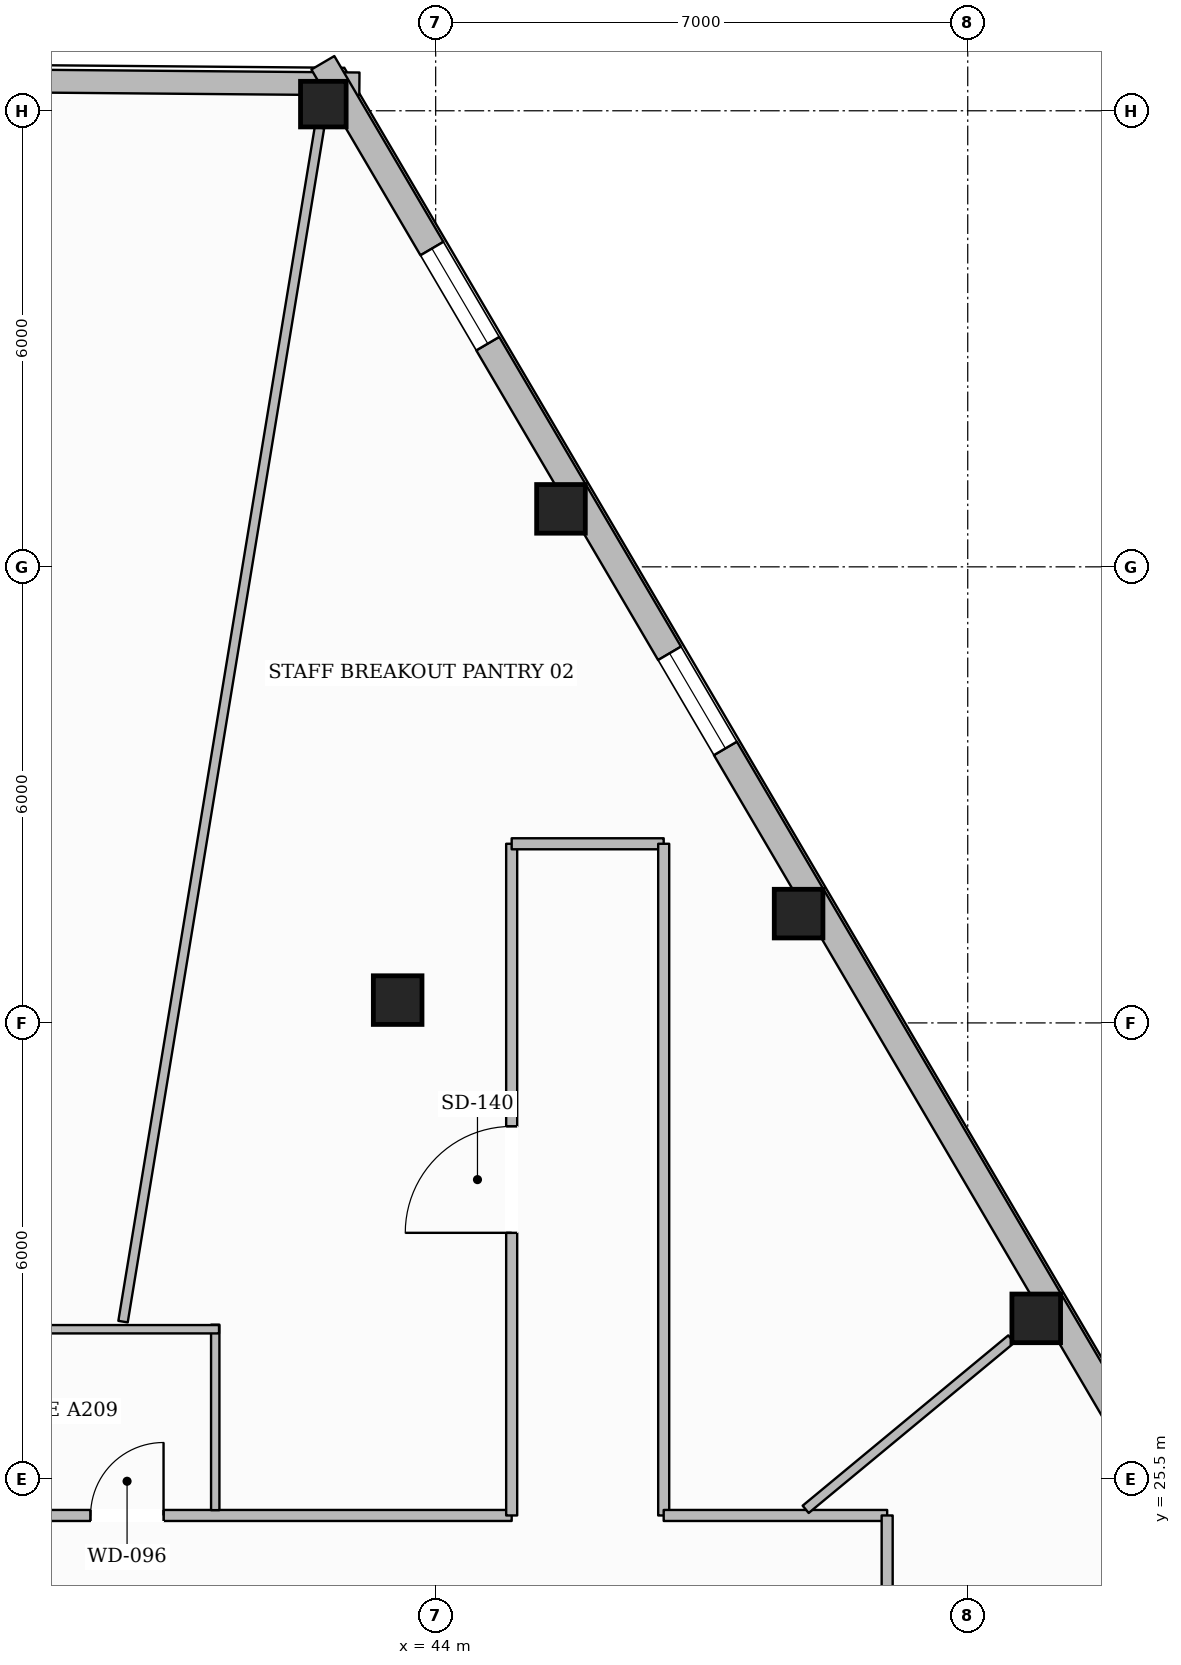
"""IFC4 building model, lengths in metres.
Left out: names, types, materials, properties, quantities, classifications, styles, units other than length and angle.
Written with IfcOpenShell. Run it as: python <this file> out.ifc"""

import sys

from ifc_helpers import new_model, si_unit, direction, frame, frame_2d, origin, origin_2d, place, context, subcontext, project, spatial, rectangle, hollow_rectangle, extrude, element, fill, save


model = new_model("IFC4")
c1 = context("Model", 3, precision=1e-05, world=origin(), true_north=direction((0.0, 1.0)))
c2 = subcontext(c1, "Body", "Model", "MODEL_VIEW")
j1 = project(units=[si_unit("LENGTHUNIT", "METRE"), si_unit("PLANEANGLEUNIT", "RADIAN")], contexts=[c1])
p1 = place(None, origin())
s1 = spatial("IfcSite", under=j1, at=p1, CompositionType="ELEMENT")
p2 = place(p1, origin())
s2 = spatial("IfcBuilding", under=s1, at=p2, CompositionType="ELEMENT")
p3 = place(p2, frame((0.0, 0.0, 191.95)))
s3 = spatial("IfcBuildingStorey", under=s2, at=p3, CompositionType="ELEMENT", Elevation=191.95)
for number, where, z_axis, x_axis in (
    (1, (51.901, 27.613, 0.0), (0.0, 0.0, 1.0), (1.0, 0.0, 0.0)),
    (2, (48.775, 32.938, 0.0), (0.0, 0.0, 1.0), (1.0, 0.0, 0.0)),
    (3, (45.648, 38.263, 0.0), (0.0, 0.0, 1.0), (1.0, 0.0, 0.0)),
):
    element("IfcColumn", number, at=place(p3, frame(where, z_axis=z_axis, x_axis=x_axis)), inside=s3, PredefinedType="COLUMN", context=c2, shape_type="SweptSolid", body=[
        extrude(hollow_rectangle(XDim=0.64, YDim=0.64, WallThickness=0.028, at=origin_2d()), origin(), (0.0, 0.0, 1.0), 3.6),
    ])
p4 = place(p3, frame((42.522, 43.587, 0.0), z_axis=(0.0, 0.0, 1.0), x_axis=(1.0, 0.0, 0.0)))
e4 = element("IfcColumn", 4, at=p4, inside=s3, PredefinedType="COLUMN", context=c2, shape_type="SweptSolid", body=[
    extrude(hollow_rectangle(XDim=0.6, YDim=0.6, WallThickness=0.028, at=origin_2d()), origin(), (0.0, 0.0, 1.0), 3.6),
])
p5 = place(p3, frame((43.5, 31.8, 0.0), z_axis=(0.0, 0.0, 1.0), x_axis=(1.0, 0.0, 0.0)))
e5 = element("IfcColumn", 5, at=p5, inside=s3, PredefinedType="COLUMN", context=c2, shape_type="SweptSolid", body=[
    extrude(hollow_rectangle(XDim=0.64, YDim=0.64, WallThickness=0.028, at=origin_2d()), origin(), (0.0, 0.0, 1.0), 3.6),
])
p6 = place(p3, frame((33.139, 43.938, 0.0), z_axis=(0.0, 0.0, 1.0), x_axis=(0.999963705721, -0.008519814607, 0.0)))
e6 = element("IfcWall", 6, at=p6, inside=s3, PredefinedType="STANDARD", context=c2, shape_type="SweptSolid", body=[
    extrude(rectangle(XDim=9.857, YDim=0.3, at=frame_2d((4.929, 0.0))), origin(), (0.0, 0.0, 1.0), 3.132),
])
p7 = place(p6, frame((4.404, 0.0, 0.65)))
e7 = element("IfcOpeningElement", 7, at=p7, cuts=e6, PredefinedType="OPENING", context=c2, shape_type="SweptSolid", body=[
    extrude(rectangle(XDim=1.05, YDim=1.7, at=frame_2d((0.525, 0.85))), frame((0.0, 0.16, 0.0), z_axis=(0.0, -1.0, 0.0), x_axis=(1.0, 0.0, 0.0)), (0.0, 0.0, 1.0), 0.32),
])
p8 = place(p3, frame((42.516, 44.131, 0.0), z_axis=(0.0, 0.0, 1.0), x_axis=(0.506310158323, -0.862351450152, 0.0)))
e8 = element("IfcWall", 8, at=p8, inside=s3, PredefinedType="STANDARD", context=c2, shape_type="SweptSolid", body=[
    extrude(rectangle(XDim=38.0, YDim=0.35, at=frame_2d((19.0, 0.0))), origin(), (0.0, 0.0, 1.0), 3.132),
])
p9 = place(p8, frame((33.708, 0.0, 0.65)))
e9 = element("IfcOpeningElement", 9, at=p9, cuts=e8, PredefinedType="OPENING", context=c2, shape_type="SweptSolid", body=[
    extrude(rectangle(XDim=1.45, YDim=1.75, at=frame_2d((0.725, 0.875))), frame((0.0, 0.185, 0.0), z_axis=(0.0, -1.0, 0.0), x_axis=(1.0, 0.0, 0.0)), (0.0, 0.0, 1.0), 0.37),
])
p10 = place(p8, frame((27.534, 0.0, 0.65)))
e10 = element("IfcOpeningElement", 10, at=p10, cuts=e8, PredefinedType="OPENING", context=c2, shape_type="SweptSolid", body=[
    extrude(rectangle(XDim=1.45, YDim=1.75, at=frame_2d((0.725, 0.875))), frame((0.0, 0.185, 0.0), z_axis=(0.0, -1.0, 0.0), x_axis=(1.0, 0.0, 0.0)), (0.0, 0.0, 1.0), 0.37),
])
p11 = place(p8, frame((21.359, 0.0, 0.65)))
e11 = element("IfcOpeningElement", 11, at=p11, cuts=e8, PredefinedType="OPENING", context=c2, shape_type="SweptSolid", body=[
    extrude(rectangle(XDim=1.45, YDim=1.75, at=frame_2d((0.725, 0.875))), frame((0.0, 0.185, 0.0), z_axis=(0.0, -1.0, 0.0), x_axis=(1.0, 0.0, 0.0)), (0.0, 0.0, 1.0), 0.37),
])
p12 = place(p8, frame((9.009, 0.0, 0.65)))
e12 = element("IfcOpeningElement", 12, at=p12, cuts=e8, PredefinedType="OPENING", context=c2, shape_type="SweptSolid", body=[
    extrude(rectangle(XDim=1.45, YDim=1.75, at=frame_2d((0.725, 0.875))), frame((0.0, 0.185, 0.0), z_axis=(0.0, -1.0, 0.0), x_axis=(1.0, 0.0, 0.0)), (0.0, 0.0, 1.0), 0.37),
])
p13 = place(p8, frame((2.834, 0.0, 0.65)))
e13 = element("IfcOpeningElement", 13, at=p13, cuts=e8, PredefinedType="OPENING", context=c2, shape_type="SweptSolid", body=[
    extrude(rectangle(XDim=1.45, YDim=1.75, at=frame_2d((0.725, 0.875))), frame((0.0, 0.185, 0.0), z_axis=(0.0, -1.0, 0.0), x_axis=(1.0, 0.0, 0.0)), (0.0, 0.0, 1.0), 0.37),
])
p14 = place(p3, frame((31.0, 25.02, 0.0), z_axis=(0.0, 0.0, 1.0), x_axis=(1.0, 0.0, 0.0)))
e14 = element("IfcWall", 14, at=p14, inside=s3, PredefinedType="PARTITIONING", context=c2, shape_type="SweptSolid", body=[
    extrude(rectangle(XDim=14.0, YDim=0.145, at=frame_2d((7.0, 0.0))), origin(), (0.0, 0.0, 1.0), 3.6),
])
p15 = place(p14, frame((3.56, 0.0, 0.0)))
e15 = element("IfcOpeningElement", 15, at=p15, cuts=e14, PredefinedType="OPENING", context=c2, shape_type="SweptSolid", body=[
    extrude(rectangle(XDim=0.88, YDim=2.1, at=frame_2d((0.44, 1.05))), frame((0.0, 0.083, 0.0), z_axis=(0.0, -1.0, 0.0), x_axis=(1.0, 0.0, 0.0)), (0.0, 0.0, 1.0), 0.165),
])
p16 = place(p14, frame((6.08, 0.0, 0.0)))
e16 = element("IfcOpeningElement", 16, at=p16, cuts=e14, PredefinedType="OPENING", context=c2, shape_type="SweptSolid", body=[
    extrude(rectangle(XDim=0.88, YDim=2.1, at=frame_2d((0.44, 1.05))), frame((0.0, 0.083, 0.0), z_axis=(0.0, -1.0, 0.0), x_axis=(1.0, 0.0, 0.0)), (0.0, 0.0, 1.0), 0.165),
])
p17 = place(p14, frame((8.46, 0.0, 0.0)))
e17 = element("IfcOpeningElement", 17, at=p17, cuts=e14, PredefinedType="OPENING", context=c2, shape_type="SweptSolid", body=[
    extrude(rectangle(XDim=0.96, YDim=2.1, at=frame_2d((0.48, 1.05))), frame((0.0, 0.083, 0.0), z_axis=(0.0, -1.0, 0.0), x_axis=(1.0, 0.0, 0.0)), (0.0, 0.0, 1.0), 0.165),
])
p18 = place(p3, frame((45.0, 25.02, 0.0), z_axis=(0.0, 0.0, 1.0), x_axis=(0.0, 1.0, 0.0)))
e18 = element("IfcWall", 18, at=p18, inside=s3, PredefinedType="PARTITIONING", context=c2, shape_type="SweptSolid", body=[
    extrude(rectangle(XDim=8.837, YDim=0.145, at=frame_2d((4.418, 0.0))), origin(), (0.0, 0.0, 1.0), 3.6),
])
p19 = place(p18, frame((3.718, 0.0, 0.0)))
e19 = element("IfcOpeningElement", 19, at=p19, cuts=e18, PredefinedType="OPENING", context=c2, shape_type="SweptSolid", body=[
    extrude(rectangle(XDim=1.4, YDim=2.2, at=frame_2d((0.7, 1.1))), frame((0.0, 0.083, 0.0), z_axis=(0.0, -1.0, 0.0), x_axis=(1.0, 0.0, 0.0)), (0.0, 0.0, 1.0), 0.165),
])
p20 = place(p3, frame((45.0, 33.857, 0.0), z_axis=(0.0, 0.0, 1.0), x_axis=(1.0, 0.0, 0.0)))
e20 = element("IfcWall", 20, at=p20, inside=s3, PredefinedType="PARTITIONING", context=c2, shape_type="SweptSolid", body=[
    extrude(rectangle(XDim=2.0, YDim=0.145, at=frame_2d((1.0, 0.0))), origin(), (0.0, 0.0, 1.0), 3.6),
])
p21 = place(p3, frame((47.0, 33.857, 0.0), z_axis=(0.0, 0.0, 1.0), x_axis=(0.0, -1.0, 0.0)))
e21 = element("IfcWall", 21, at=p21, inside=s3, PredefinedType="PARTITIONING", context=c2, shape_type="SweptSolid", body=[
    extrude(rectangle(XDim=8.837, YDim=0.145, at=frame_2d((4.418, 0.0))), origin(), (0.0, 0.0, 1.0), 3.6),
])
p22 = place(p3, frame((47.0, 25.02, 0.0), z_axis=(0.0, 0.0, 1.0), x_axis=(1.0, 0.0, 0.0)))
e22 = element("IfcWall", 22, at=p22, inside=s3, PredefinedType="PARTITIONING", context=c2, shape_type="SweptSolid", body=[
    extrude(rectangle(XDim=2.94, YDim=0.145, at=frame_2d((1.47, 0.0))), origin(), (0.0, 0.0, 1.0), 3.6),
])
p23 = place(p3, frame((49.94, 25.02, 0.0), z_axis=(0.0, 0.0, 1.0), x_axis=(0.0, -1.0, 0.0)))
e23 = element("IfcWall", 23, at=p23, inside=s3, PredefinedType="PARTITIONING", context=c2, shape_type="SweptSolid", body=[
    extrude(rectangle(XDim=7.92, YDim=0.145, at=frame_2d((3.96, 0.0))), origin(), (0.0, 0.0, 1.0), 3.339),
])
p24 = place(p23, frame((1.671, 0.0, 0.0)))
e24 = element("IfcOpeningElement", 24, at=p24, cuts=e23, PredefinedType="OPENING", context=c2, shape_type="SweptSolid", body=[
    extrude(rectangle(XDim=0.98, YDim=2.15, at=frame_2d((0.49, 1.075))), frame((0.0, 0.083, 0.0), z_axis=(0.0, -1.0, 0.0), x_axis=(1.0, 0.0, 0.0)), (0.0, 0.0, 1.0), 0.165),
])
p25 = place(p3, frame((41.1, 25.09, 0.0), z_axis=(0.0, 0.0, 1.0), x_axis=(0.0, 1.0, 0.0)))
e25 = element("IfcWall", 25, at=p25, inside=s3, PredefinedType="PLUMBINGWALL", context=c2, shape_type="SweptSolid", body=[
    extrude(rectangle(XDim=2.44, YDim=0.11, at=frame_2d((1.22, 0.0))), origin(), (0.0, 0.0, 1.0), 3.6),
])
p26 = place(p3, frame((33.69, 27.47, 0.0), z_axis=(0.0, 0.0, 1.0), x_axis=(1.0, 0.0, 0.0)))
e26 = element("IfcWall", 26, at=p26, inside=s3, PredefinedType="PLUMBINGWALL", context=c2, shape_type="SweptSolid", body=[
    extrude(rectangle(XDim=7.46, YDim=0.11, at=frame_2d((3.73, 0.0))), origin(), (0.0, 0.0, 1.0), 3.6),
])
p27 = place(p3, frame((48.868, 25.101, 0.0), z_axis=(0.0, 0.0, 1.0), x_axis=(0.77016591737, 0.637843601302, 0.0)))
e27 = element("IfcWall", 27, at=p27, inside=s3, PredefinedType="PARTITIONING", context=c2, shape_type="SweptSolid", body=[
    extrude(rectangle(XDim=3.513, YDim=0.125, at=frame_2d((1.756, 0.0))), origin(), (0.0, 0.0, 1.0), 3.141),
])
p28 = place(p3, frame((39.887, 27.57, 0.0), z_axis=(0.0, 0.0, 1.0), x_axis=(0.162334640523, 0.986735762241, 0.0)))
e28 = element("IfcWall", 28, at=p28, inside=s3, PredefinedType="PARTITIONING", context=c2, shape_type="SweptSolid", body=[
    extrude(rectangle(XDim=15.921, YDim=0.125, at=frame_2d((7.96, 0.0))), origin(), (0.0, 0.0, 1.0), 3.141),
])
p29 = place(p12, origin())
e29 = element("IfcWindow", 29, at=p29, inside=s3, PartitioningType="SINGLE_PANEL", PredefinedType="WINDOW", context=c2, shape_type="SweptSolid", body=[
    extrude(rectangle(XDim=1.45, YDim=1.75, at=frame_2d((0.725, 0.875))), frame((0.0, 0.03, 0.0), z_axis=(0.0, -1.0, 0.0), x_axis=(1.0, 0.0, 0.0)), (0.0, 0.0, 1.0), 0.06),
])
fill(e12, e29)
p30 = place(p13, origin())
e30 = element("IfcWindow", 30, at=p30, inside=s3, PartitioningType="SINGLE_PANEL", PredefinedType="WINDOW", context=c2, shape_type="SweptSolid", body=[
    extrude(rectangle(XDim=1.45, YDim=1.75, at=frame_2d((0.725, 0.875))), frame((0.0, 0.03, 0.0), z_axis=(0.0, -1.0, 0.0), x_axis=(1.0, 0.0, 0.0)), (0.0, 0.0, 1.0), 0.06),
])
fill(e13, e30)
p31 = place(p17, origin())
e31 = element("IfcDoor", 31, at=p31, inside=s3, OperationType="SINGLE_SWING_RIGHT", PredefinedType="DOOR", context=c2, shape_type="SweptSolid", body=[
    extrude(rectangle(XDim=0.96, YDim=2.1, at=frame_2d((0.48, 1.05))), frame((0.0, 0.025, 0.0), z_axis=(0.0, -1.0, 0.0), x_axis=(1.0, 0.0, 0.0)), (0.0, 0.0, 1.0), 0.05),
])
fill(e17, e31)
p32 = place(p19, origin())
e32 = element("IfcDoor", 32, at=p32, inside=s3, OperationType="SINGLE_SWING_LEFT", PredefinedType="DOOR", context=c2, shape_type="SweptSolid", body=[
    extrude(rectangle(XDim=1.4, YDim=2.2, at=frame_2d((0.7, 1.1))), frame((0.0, 0.025, 0.0), z_axis=(0.0, -1.0, 0.0), x_axis=(1.0, 0.0, 0.0)), (0.0, 0.0, 1.0), 0.05),
])
fill(e19, e32)
save(model, sys.argv[1])
